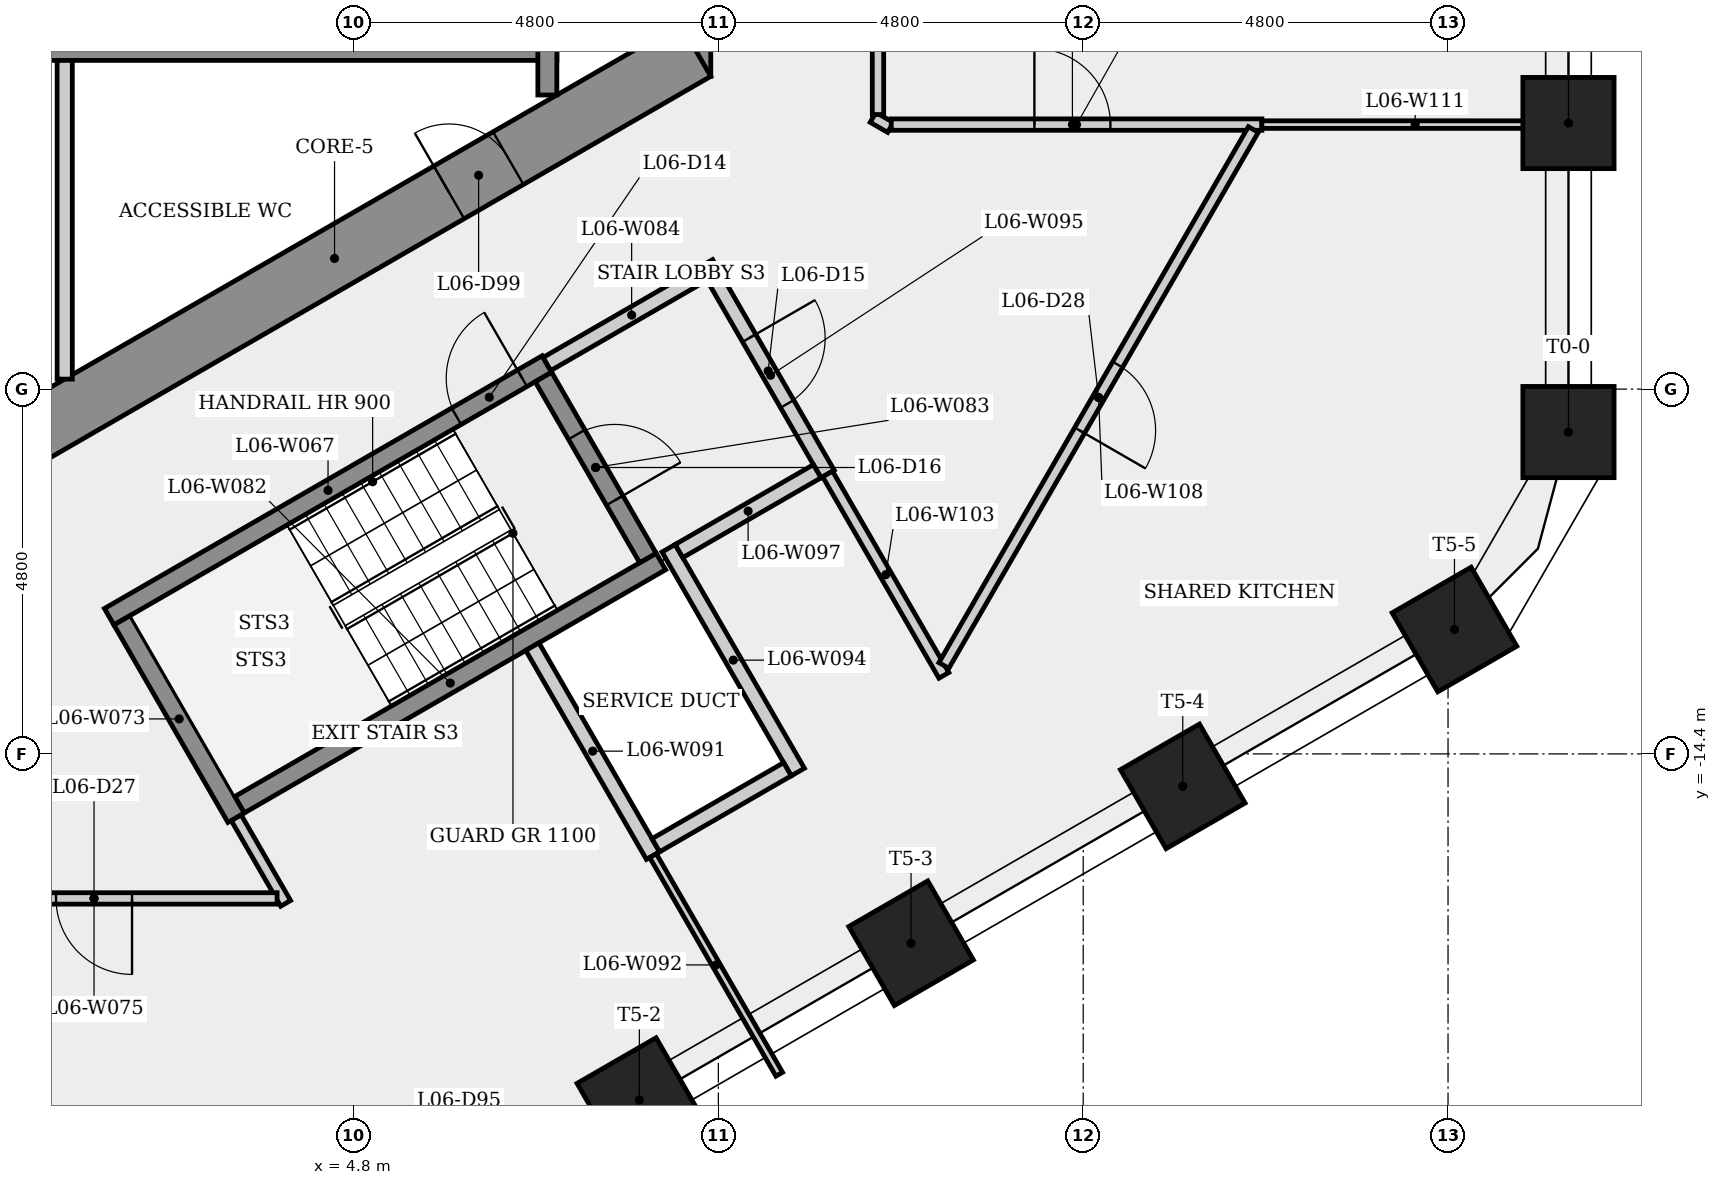
"""IFC4 building model, lengths in metres.
Left out: names, types, materials, properties, quantities, classifications, styles, units other than length and angle.
Written with IfcOpenShell. Run it as: python <this file> out.ifc"""

import sys

from ifc_helpers import new_model, si_unit, direction, frame, frame_2d, origin, origin_2d, place, context, subcontext, project, spatial, rectangle, extrude, element, fill, save


model = new_model("IFC4")
c1 = context("Model", 3, precision=1e-05, world=origin(), true_north=direction((0.0, 1.0)))
c2 = subcontext(c1, "Body", "Model", "MODEL_VIEW")
j1 = project(units=[si_unit("LENGTHUNIT", "METRE"), si_unit("PLANEANGLEUNIT", "RADIAN")], contexts=[c1])
p1 = place(None, origin())
s1 = spatial("IfcSite", under=j1, at=p1, CompositionType="ELEMENT")
p2 = place(p1, origin())
s2 = spatial("IfcBuilding", under=s1, at=p2, CompositionType="ELEMENT")
p3 = place(p2, frame((0.0, 0.0, 28.9)))
s3 = spatial("IfcBuildingStorey", under=s2, at=p3, CompositionType="ELEMENT", Elevation=28.9)
p4 = place(p3, frame((9.1, -5.485, 0.0), z_axis=(0.0, 0.0, 1.0), x_axis=(0.0, 1.0, 0.0)))
e1 = element("IfcWall", 1, at=p4, inside=s3, PredefinedType="SHEAR", context=c2, shape_type="SweptSolid", body=[
    extrude(rectangle(XDim=10.97, YDim=0.8, at=frame_2d((5.485, 0.0))), origin(), (0.0, 0.0, 1.0), 3.4),
])
p5 = place(p4, frame((4.685, 0.0, 0.0)))
e2 = element("IfcOpeningElement", 2, at=p5, cuts=e1, PredefinedType="OPENING", context=c2, shape_type="SweptSolid", body=[
    extrude(rectangle(XDim=1.6, YDim=2.1, at=frame_2d((0.8, 1.05))), frame((0.0, 0.41, 0.0), z_axis=(0.0, -1.0, 0.0), x_axis=(1.0, 0.0, 0.0)), (0.0, 0.0, 1.0), 0.82),
])
p6 = place(p3, frame((-0.2, -10.623, 0.0), z_axis=(0.0, 0.0, 1.0), x_axis=(0.866023993627, 0.500002442456, 0.0)))
e3 = element("IfcWall", 3, at=p6, inside=s3, PredefinedType="SHEAR", context=c2, shape_type="SweptSolid", body=[
    extrude(rectangle(XDim=10.97, YDim=0.8, at=frame_2d((5.485, 0.0))), origin(), (0.0, 0.0, 1.0), 3.4),
])
p7 = place(p6, frame((7.224, 0.0, 0.0)))
e4 = element("IfcOpeningElement", 4, at=p7, cuts=e3, PredefinedType="OPENING", context=c2, shape_type="SweptSolid", body=[
    extrude(rectangle(XDim=0.9, YDim=2.1, at=frame_2d((0.45, 1.05))), frame((0.0, 0.41, 0.0), z_axis=(0.0, -1.0, 0.0), x_axis=(1.0, 0.0, 0.0)), (0.0, 0.0, 1.0), 0.82),
])
for number, where, z_axis, x_axis in (
    (5, (20.785, -10.165, 0.0), (0.0, 0.0, 1.0), (1.0, 0.0, 0.0)),
    (6, (20.785, -6.099, 0.0), (0.0, 0.0, 1.0), (1.0, 0.0, 0.0)),
    (7, (8.561, -18.955, 0.0), (0.0, 0.0, 1.0), (0.5, -0.866, 0.0)),
    (8, (12.135, -16.891, 0.0), (0.0, 0.0, 1.0), (0.5, -0.866, 0.0)),
    (9, (15.71, -14.827, 0.0), (0.0, 0.0, 1.0), (0.5, -0.866, 0.0)),
    (10, (19.285, -12.763, 0.0), (0.0, 0.0, 1.0), (0.5, -0.866, 0.0)),
):
    element("IfcColumn", number, at=place(p3, frame(where, z_axis=z_axis, x_axis=x_axis)), inside=s3, PredefinedType="COLUMN", context=c2, shape_type="SweptSolid", body=[
        extrude(rectangle(XDim=1.2, YDim=1.2, at=origin_2d()), origin(), (0.0, 0.0, 1.0), 3.4),
    ])
p8 = place(p3, frame((-7.225, -5.15, 0.0), z_axis=(0.0, 0.0, 1.0), x_axis=(1.0, 0.0, 0.0)))
e11 = element("IfcWall", 11, at=p8, inside=s3, PredefinedType="SHEAR", context=c2, shape_type="SweptSolid", body=[
    extrude(rectangle(XDim=14.7, YDim=0.25, at=frame_2d((7.35, 0.0))), origin(), (0.0, 0.0, 1.0), 3.05),
])
p9 = place(p3, frame((1.0, -5.275, 0.0), z_axis=(0.0, 0.0, 1.0), x_axis=(0.0, -1.0, 0.0)))
e12 = element("IfcWall", 12, at=p9, inside=s3, PredefinedType="PARTITIONING", context=c2, shape_type="SweptSolid", body=[
    extrude(rectangle(XDim=4.194, YDim=0.2, at=frame_2d((2.097, 0.0))), origin(), (0.0, 0.0, 1.0), 3.05),
])
p10 = place(p3, frame((1.585, -12.595, 0.0), z_axis=(0.0, 0.0, 1.0), x_axis=(0.866036417653, 0.499980922934, 0.0)))
e13 = element("IfcWall", 13, at=p10, inside=s3, PredefinedType="SHEAR", context=c2, shape_type="SweptSolid", body=[
    extrude(rectangle(XDim=6.65, YDim=0.25, at=frame_2d((3.325, 0.0))), origin(), (0.0, 0.0, 1.0), 3.05),
])
p11 = place(p10, frame((5.275, 0.0, 0.0)))
e14 = element("IfcOpeningElement", 14, at=p11, cuts=e13, PredefinedType="OPENING", context=c2, shape_type="SweptSolid", body=[
    extrude(rectangle(XDim=1.0, YDim=2.1, at=frame_2d((0.5, 1.05))), frame((0.0, 0.135, 0.0), z_axis=(0.0, -1.0, 0.0), x_axis=(1.0, 0.0, 0.0)), (0.0, 0.0, 1.0), 0.27),
])
p12 = place(p3, frame((3.256, -15.239, 0.0), z_axis=(0.0, 0.0, 1.0), x_axis=(0.499949632511, -0.866054481515, 0.0)))
e15 = element("IfcWall", 15, at=p12, inside=s3, PredefinedType="PARTITIONING", context=c2, shape_type="SweptSolid", body=[
    extrude(rectangle(XDim=1.302, YDim=0.15, at=frame_2d((0.651, 0.0))), origin(), (0.0, 0.0, 1.0), 3.05),
])
p13 = place(p3, frame((3.256, -15.239, 0.0), z_axis=(0.0, 0.0, 1.0), x_axis=(-0.50002537861, 0.866010750942, 0.0)))
e16 = element("IfcWall", 16, at=p13, inside=s3, PredefinedType="SHEAR", context=c2, shape_type="SweptSolid", body=[
    extrude(rectangle(XDim=3.0, YDim=0.25, at=frame_2d((1.5, 0.0))), origin(), (0.0, 0.0, 1.0), 3.05),
])
p14 = place(p3, frame((3.794, -16.302, 0.0), z_axis=(0.0, 0.0, 1.0), x_axis=(-1.0, 0.0, 0.0)))
e17 = element("IfcWall", 17, at=p14, inside=s3, PredefinedType="PARTITIONING", context=c2, shape_type="SweptSolid", body=[
    extrude(rectangle(XDim=4.817, YDim=0.15, at=frame_2d((2.409, 0.0))), origin(), (0.0, 0.0, 1.0), 3.05),
])
p15 = place(p14, frame((1.908, 0.0, 0.0)))
e18 = element("IfcOpeningElement", 18, at=p15, cuts=e17, PredefinedType="OPENING", context=c2, shape_type="SweptSolid", body=[
    extrude(rectangle(XDim=1.0, YDim=2.1, at=frame_2d((0.5, 1.05))), frame((0.0, 0.085, 0.0), z_axis=(0.0, -1.0, 0.0), x_axis=(1.0, 0.0, 0.0)), (0.0, 0.0, 1.0), 0.17),
])
p16 = place(p3, frame((3.301, -15.068, 0.0), z_axis=(0.0, 0.0, 1.0), x_axis=(0.866035036182, 0.499983315828, 0.0)))
e19 = element("IfcWall", 19, at=p16, inside=s3, PredefinedType="SHEAR", context=c2, shape_type="SweptSolid", body=[
    extrude(rectangle(XDim=6.4, YDim=0.25, at=frame_2d((3.2, 0.0))), origin(), (0.0, 0.0, 1.0), 3.05),
])
p17 = place(p3, frame((7.298, -9.441, 0.0), z_axis=(0.0, 0.0, 1.0), x_axis=(0.500034990121, -0.866005201286, 0.0)))
e20 = element("IfcWall", 20, at=p17, inside=s3, PredefinedType="SHEAR", context=c2, shape_type="SweptSolid", body=[
    extrude(rectangle(XDim=2.75, YDim=0.25, at=frame_2d((1.375, 0.0))), origin(), (0.0, 0.0, 1.0), 3.05),
])
p18 = place(p17, frame((0.875, 0.0, 0.0)))
e21 = element("IfcOpeningElement", 21, at=p18, cuts=e20, PredefinedType="OPENING", context=c2, shape_type="SweptSolid", body=[
    extrude(rectangle(XDim=1.0, YDim=2.1, at=frame_2d((0.5, 1.05))), frame((0.0, 0.135, 0.0), z_axis=(0.0, -1.0, 0.0), x_axis=(1.0, 0.0, 0.0)), (0.0, 0.0, 1.0), 0.27),
])
p19 = place(p3, frame((7.344, -9.27, 0.0), z_axis=(0.0, 0.0, 1.0), x_axis=(0.866005588531, 0.500034319456, 0.0)))
e22 = element("IfcWall", 22, at=p19, inside=s3, PredefinedType="PARTITIONING", context=c2, shape_type="SweptSolid", body=[
    extrude(rectangle(XDim=2.575, YDim=0.2, at=frame_2d((1.288, 0.0))), origin(), (0.0, 0.0, 1.0), 3.05),
])
p20 = place(p3, frame((7.35, -1.925, 0.0), z_axis=(0.0, 0.0, 1.0), x_axis=(0.0, -1.0, 0.0)))
e23 = element("IfcWall", 23, at=p20, inside=s3, PredefinedType="SHEAR", context=c2, shape_type="SweptSolid", body=[
    extrude(rectangle(XDim=3.805, YDim=0.25, at=frame_2d((1.903, 0.0))), origin(), (0.0, 0.0, 1.0), 3.05),
])
p21 = place(p3, frame((7.153, -12.989, 0.0), z_axis=(0.0, 0.0, 1.0), x_axis=(0.500017526161, -0.866015284814, 0.0)))
e24 = element("IfcWall", 24, at=p21, inside=s3, PredefinedType="PLUMBINGWALL", context=c2, shape_type="SweptSolid", body=[
    extrude(rectangle(XDim=3.175, YDim=0.2, at=frame_2d((1.588, 0.0))), origin(), (0.0, 0.0, 1.0), 3.05),
])
p22 = place(p3, frame((8.74, -15.738, 0.0), z_axis=(0.0, 0.0, 1.0), x_axis=(0.500036335164, -0.866004424651, 0.0)))
e25 = element("IfcWall", 25, at=p22, inside=s3, PredefinedType="PARTITIONING", context=c2, shape_type="SweptSolid", body=[
    extrude(rectangle(XDim=3.322, YDim=0.1, at=frame_2d((1.661, 0.0))), origin(), (0.0, 0.0, 1.0), 3.05),
])
p23 = place(p3, frame((8.945, -11.694, 0.0), z_axis=(0.0, 0.0, 1.0), x_axis=(0.500062241894, -0.865989465428, 0.0)))
e26 = element("IfcWall", 26, at=p23, inside=s3, PredefinedType="PLUMBINGWALL", context=c2, shape_type="SweptSolid", body=[
    extrude(rectangle(XDim=3.4, YDim=0.2, at=frame_2d((1.7, 0.0))), origin(), (0.0, 0.0, 1.0), 3.05),
])
p24 = place(p3, frame((9.537, -8.119, 0.0), z_axis=(0.0, 0.0, 1.0), x_axis=(0.499990139034, -0.866031096941, 0.0)))
e27 = element("IfcWall", 27, at=p24, inside=s3, PredefinedType="PARTITIONING", context=c2, shape_type="SweptSolid", body=[
    extrude(rectangle(XDim=3.0, YDim=0.2, at=frame_2d((1.5, 0.0))), origin(), (0.0, 0.0, 1.0), 3.05),
])
p25 = place(p24, frame((0.935, 0.0, 0.0)))
e28 = element("IfcOpeningElement", 28, at=p25, cuts=e27, PredefinedType="OPENING", context=c2, shape_type="SweptSolid", body=[
    extrude(rectangle(XDim=1.0, YDim=2.1, at=frame_2d((0.5, 1.05))), frame((0.0, 0.11, 0.0), z_axis=(0.0, -1.0, 0.0), x_axis=(1.0, 0.0, 0.0)), (0.0, 0.0, 1.0), 0.22),
])
p26 = place(p3, frame((10.509, -14.602, 0.0), z_axis=(0.0, 0.0, 1.0), x_axis=(-0.866010750942, -0.50002537861, 0.0)))
e29 = element("IfcWall", 29, at=p26, inside=s3, PredefinedType="PLUMBINGWALL", context=c2, shape_type="SweptSolid", body=[
    extrude(rectangle(XDim=2.0, YDim=0.2, at=frame_2d((1.0, 0.0))), origin(), (0.0, 0.0, 1.0), 3.05),
])
p27 = place(p3, frame((10.901, -10.681, 0.0), z_axis=(0.0, 0.0, 1.0), x_axis=(-0.866009402589, -0.500027713859, 0.0)))
e30 = element("IfcWall", 30, at=p27, inside=s3, PredefinedType="PARTITIONING", context=c2, shape_type="SweptSolid", body=[
    extrude(rectangle(XDim=2.1, YDim=0.2, at=frame_2d((1.05, 0.0))), origin(), (0.0, 0.0, 1.0), 3.05),
])
p28 = place(p3, frame((11.635, -6.025, 0.0), z_axis=(0.0, 0.0, 1.0), x_axis=(0.865909406545, -0.500200859313, 0.0)))
e31 = element("IfcWall", 31, at=p28, inside=s3, PredefinedType="PARTITIONING", context=c2, shape_type="SweptSolid", body=[
    extrude(rectangle(XDim=0.265, YDim=0.15, at=frame_2d((0.133, 0.0))), origin(), (0.0, 0.0, 1.0), 3.05),
])
p29 = place(p3, frame((11.7, -5.987, 0.0), z_axis=(0.0, 0.0, 1.0), x_axis=(0.0, 1.0, 0.0)))
e32 = element("IfcWall", 32, at=p29, inside=s3, PredefinedType="PARTITIONING", context=c2, shape_type="SweptSolid", body=[
    extrude(rectangle(XDim=12.125, YDim=0.15, at=frame_2d((6.062, 0.0))), origin(), (0.0, 0.0, 1.0), 3.05),
])
p30 = place(p29, frame((7.513, 0.0, 0.0)))
e33 = element("IfcOpeningElement", 33, at=p30, cuts=e32, PredefinedType="OPENING", context=c2, shape_type="SweptSolid", body=[
    extrude(rectangle(XDim=1.0, YDim=2.1, at=frame_2d((0.5, 1.05))), frame((0.0, 0.085, 0.0), z_axis=(0.0, -1.0, 0.0), x_axis=(1.0, 0.0, 0.0)), (0.0, 0.0, 1.0), 0.17),
])
p31 = place(p3, frame((11.875, -6.12, 0.0), z_axis=(0.0, 0.0, 1.0), x_axis=(1.0, 0.0, 0.0)))
e34 = element("IfcWall", 34, at=p31, inside=s3, PredefinedType="PARTITIONING", context=c2, shape_type="SweptSolid", body=[
    extrude(rectangle(XDim=4.876, YDim=0.15, at=frame_2d((2.438, 0.0))), origin(), (0.0, 0.0, 1.0), 3.05),
])
p32 = place(p31, frame((1.883, 0.0, 0.0)))
e35 = element("IfcOpeningElement", 35, at=p32, cuts=e34, PredefinedType="OPENING", context=c2, shape_type="SweptSolid", body=[
    extrude(rectangle(XDim=1.0, YDim=2.1, at=frame_2d((0.5, 1.05))), frame((0.0, 0.085, 0.0), z_axis=(0.0, -1.0, 0.0), x_axis=(1.0, 0.0, 0.0)), (0.0, 0.0, 1.0), 0.17),
])
p33 = place(p3, frame((12.567, -13.367, 0.0), z_axis=(0.0, 0.0, 1.0), x_axis=(-0.49994119861, 0.866059350121, 0.0)))
e36 = element("IfcWall", 36, at=p33, inside=s3, PredefinedType="PARTITIONING", context=c2, shape_type="SweptSolid", body=[
    extrude(rectangle(XDim=3.059, YDim=0.15, at=frame_2d((1.53, 0.0))), origin(), (0.0, 0.0, 1.0), 3.05),
])
p34 = place(p3, frame((16.638, -6.185, 0.0), z_axis=(0.0, 0.0, 1.0), x_axis=(-0.49999235763, -0.866029816064, 0.0)))
e37 = element("IfcWall", 37, at=p34, inside=s3, PredefinedType="PARTITIONING", context=c2, shape_type="SweptSolid", body=[
    extrude(rectangle(XDim=8.143, YDim=0.15, at=frame_2d((4.072, 0.0))), origin(), (0.0, 0.0, 1.0), 3.05),
])
p35 = place(p34, frame((3.572, 0.0, 0.0)))
e38 = element("IfcOpeningElement", 38, at=p35, cuts=e37, PredefinedType="OPENING", context=c2, shape_type="SweptSolid", body=[
    extrude(rectangle(XDim=1.0, YDim=2.1, at=frame_2d((0.5, 1.05))), frame((0.0, 0.085, 0.0), z_axis=(0.0, -1.0, 0.0), x_axis=(1.0, 0.0, 0.0)), (0.0, 0.0, 1.0), 0.17),
])
p36 = place(p3, frame((20.785, -6.12, 0.0), z_axis=(0.0, 0.0, 1.0), x_axis=(-1.0, 0.0, 0.0)))
e39 = element("IfcWall", 39, at=p36, inside=s3, PredefinedType="PARTITIONING", context=c2, shape_type="SweptSolid", body=[
    extrude(rectangle(XDim=4.034, YDim=0.1, at=frame_2d((2.017, 0.0))), origin(), (0.0, 0.0, 1.0), 3.05),
])
p37 = place(p11, origin())
e40 = element("IfcDoor", 40, at=p37, inside=s3, OperationType="SINGLE_SWING_RIGHT", PredefinedType="DOOR", context=c2, shape_type="SweptSolid", body=[
    extrude(rectangle(XDim=1.0, YDim=2.1, at=frame_2d((0.5, 1.05))), frame((0.0, 0.025, 0.0), z_axis=(0.0, -1.0, 0.0), x_axis=(1.0, 0.0, 0.0)), (0.0, 0.0, 1.0), 0.05),
])
fill(e14, e40)
p38 = place(p25, origin())
e41 = element("IfcDoor", 41, at=p38, inside=s3, OperationType="SINGLE_SWING_LEFT", PredefinedType="DOOR", context=c2, shape_type="SweptSolid", body=[
    extrude(rectangle(XDim=1.0, YDim=2.1, at=frame_2d((0.5, 1.05))), frame((0.0, 0.025, 0.0), z_axis=(0.0, -1.0, 0.0), x_axis=(1.0, 0.0, 0.0)), (0.0, 0.0, 1.0), 0.05),
])
fill(e28, e41)
p39 = place(p18, origin())
e42 = element("IfcDoor", 42, at=p39, inside=s3, OperationType="SINGLE_SWING_RIGHT", PredefinedType="DOOR", context=c2, shape_type="SweptSolid", body=[
    extrude(rectangle(XDim=1.0, YDim=2.1, at=frame_2d((0.5, 1.05))), frame((0.0, 0.025, 0.0), z_axis=(0.0, -1.0, 0.0), x_axis=(1.0, 0.0, 0.0)), (0.0, 0.0, 1.0), 0.05),
])
fill(e21, e42)
p40 = place(p32, origin())
e43 = element("IfcDoor", 43, at=p40, inside=s3, OperationType="SINGLE_SWING_LEFT", PredefinedType="DOOR", context=c2, shape_type="SweptSolid", body=[
    extrude(rectangle(XDim=1.0, YDim=2.1, at=frame_2d((0.5, 1.05))), frame((0.0, 0.025, 0.0), z_axis=(0.0, -1.0, 0.0), x_axis=(1.0, 0.0, 0.0)), (0.0, 0.0, 1.0), 0.05),
])
fill(e35, e43)
p41 = place(p15, origin())
e44 = element("IfcDoor", 44, at=p41, inside=s3, OperationType="SINGLE_SWING_LEFT", PredefinedType="DOOR", context=c2, shape_type="SweptSolid", body=[
    extrude(rectangle(XDim=1.0, YDim=2.1, at=frame_2d((0.5, 1.05))), frame((0.0, 0.025, 0.0), z_axis=(0.0, -1.0, 0.0), x_axis=(1.0, 0.0, 0.0)), (0.0, 0.0, 1.0), 0.05),
])
fill(e18, e44)
p42 = place(p35, origin())
e45 = element("IfcDoor", 45, at=p42, inside=s3, OperationType="SINGLE_SWING_RIGHT", PredefinedType="DOOR", context=c2, shape_type="SweptSolid", body=[
    extrude(rectangle(XDim=1.0, YDim=2.1, at=frame_2d((0.5, 1.05))), frame((0.0, 0.025, 0.0), z_axis=(0.0, -1.0, 0.0), x_axis=(1.0, 0.0, 0.0)), (0.0, 0.0, 1.0), 0.05),
])
fill(e38, e45)
p43 = place(p7, origin())
e46 = element("IfcDoor", 46, at=p43, inside=s3, OperationType="SINGLE_SWING_LEFT", PredefinedType="DOOR", context=c2, shape_type="SweptSolid", body=[
    extrude(rectangle(XDim=0.9, YDim=2.1, at=frame_2d((0.45, 1.05))), frame((0.0, 0.025, 0.0), z_axis=(0.0, -1.0, 0.0), x_axis=(1.0, 0.0, 0.0)), (0.0, 0.0, 1.0), 0.05),
])
fill(e4, e46)
save(model, sys.argv[1])
